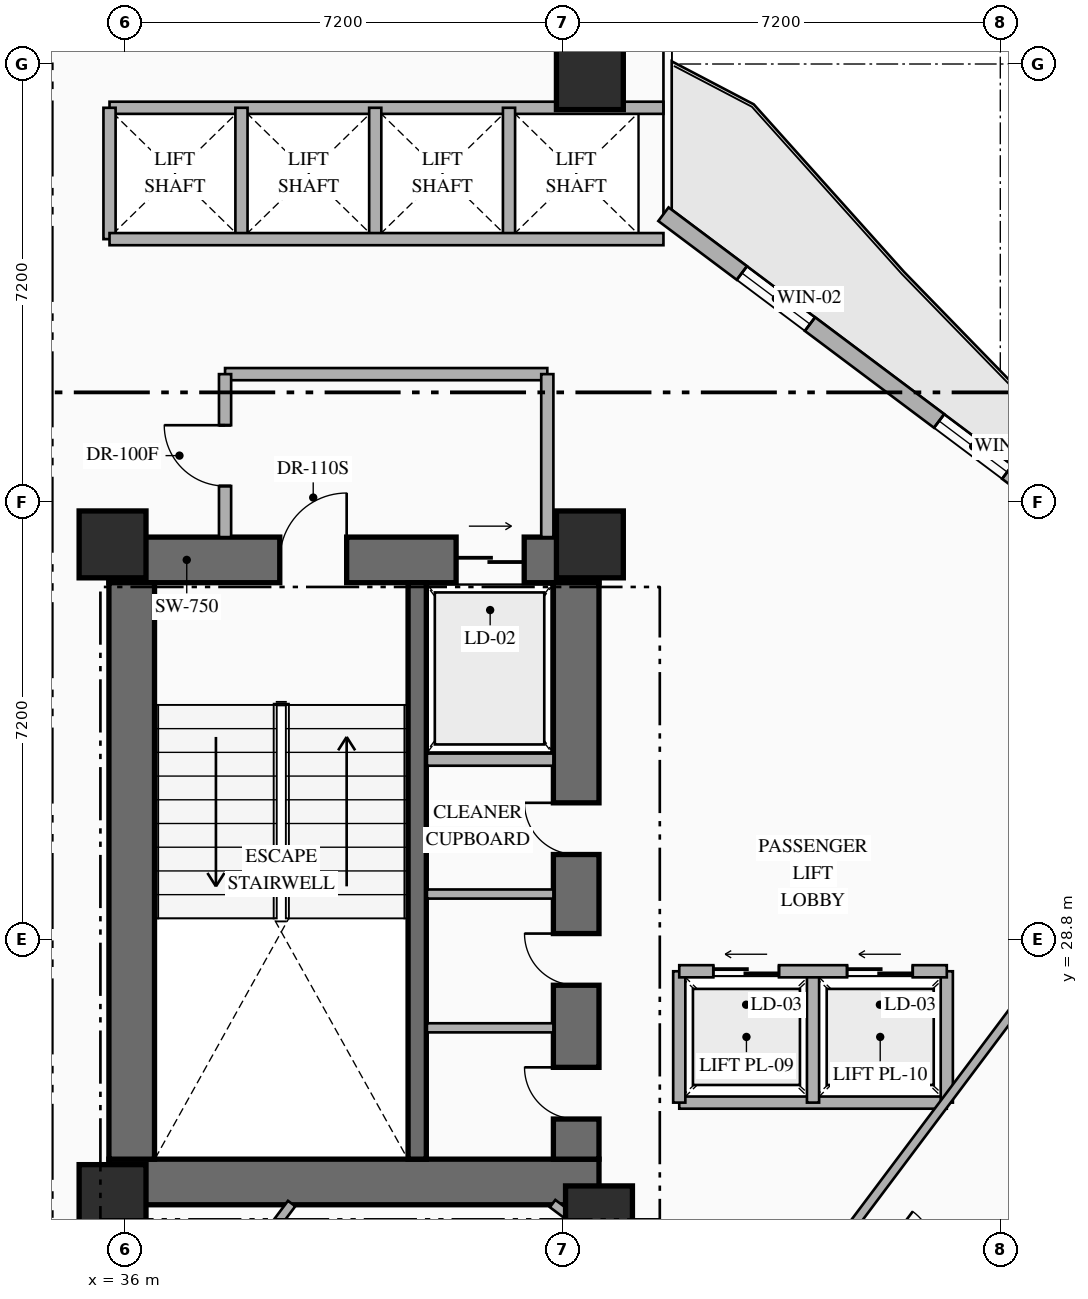
"""IFC4 building model, lengths in metres.
Left out: names, types, materials, properties, quantities, classifications, styles, units other than length and angle.
Written with IfcOpenShell. Run it as: python <this file> out.ifc"""

import sys

from ifc_helpers import new_model, si_unit, direction, frame, frame_2d, origin, origin_2d, place, context, subcontext, project, spatial, rectangle, extrude, element, fill, save


model = new_model("IFC4")
c1 = context("Model", 3, precision=1e-05, world=origin(), true_north=direction((0.0, 1.0)))
c2 = subcontext(c1, "Body", "Model", "MODEL_VIEW")
j1 = project(units=[si_unit("LENGTHUNIT", "METRE"), si_unit("PLANEANGLEUNIT", "RADIAN")], contexts=[c1])
p1 = place(None, origin())
s1 = spatial("IfcSite", under=j1, at=p1, CompositionType="ELEMENT")
p2 = place(p1, origin())
s2 = spatial("IfcBuilding", under=s1, at=p2, CompositionType="ELEMENT")
p3 = place(p2, frame((0.0, 0.0, 60.05)))
s3 = spatial("IfcBuildingStorey", under=s2, at=p3, CompositionType="ELEMENT", Elevation=60.05)
p4 = place(p3, frame((35.74, 24.815, 0.0), z_axis=(0.0, 0.0, 1.0), x_axis=(1.0, 0.0, 0.0)))
e1 = element("IfcWall", 1, at=p4, inside=s3, PredefinedType="SHEAR", context=c2, shape_type="SweptSolid", body=[
    extrude(rectangle(XDim=8.06, YDim=0.75, at=frame_2d((4.03, 0.0))), origin(), (0.0, 0.0, 1.0), 3.35),
])
p5 = place(p3, frame((35.74, 35.045, 0.0), z_axis=(0.0, 0.0, 1.0), x_axis=(1.0, 0.0, 0.0)))
e2 = element("IfcWall", 2, at=p5, inside=s3, PredefinedType="SHEAR", context=c2, shape_type="SweptSolid", body=[
    extrude(rectangle(XDim=8.06, YDim=0.75, at=frame_2d((4.03, 0.0))), origin(), (0.0, 0.0, 1.0), 3.35),
])
p6 = place(p5, frame((2.81, 0.0, 0.0)))
e3 = element("IfcOpeningElement", 3, at=p6, cuts=e2, PredefinedType="OPENING", context=c2, shape_type="SweptSolid", body=[
    extrude(rectangle(XDim=1.1, YDim=2.2, at=frame_2d((0.55, 1.1))), frame((0.0, 0.385, 0.0), z_axis=(0.0, -1.0, 0.0), x_axis=(1.0, 0.0, 0.0)), (0.0, 0.0, 1.0), 0.77),
])
p7 = place(p5, frame((5.71, 0.0, 0.0)))
e4 = element("IfcOpeningElement", 4, at=p7, cuts=e2, PredefinedType="OPENING", context=c2, shape_type="SweptSolid", body=[
    extrude(rectangle(XDim=1.12, YDim=2.15, at=frame_2d((0.56, 1.075))), frame((0.0, 0.385, 0.0), z_axis=(0.0, -1.0, 0.0), x_axis=(1.0, 0.0, 0.0)), (0.0, 0.0, 1.0), 0.77),
])
p8 = place(p3, frame((36.115, 25.19, 0.0), z_axis=(0.0, 0.0, 1.0), x_axis=(0.0, 1.0, 0.0)))
e5 = element("IfcWall", 5, at=p8, inside=s3, PredefinedType="SHEAR", context=c2, shape_type="SweptSolid", body=[
    extrude(rectangle(XDim=9.48, YDim=0.75, at=frame_2d((4.74, 0.0))), origin(), (0.0, 0.0, 1.0), 3.35),
])
p9 = place(p3, frame((43.425, 25.19, 0.0), z_axis=(0.0, 0.0, 1.0), x_axis=(0.0, 1.0, 0.0)))
e6 = element("IfcWall", 6, at=p9, inside=s3, PredefinedType="SHEAR", context=c2, shape_type="SweptSolid", body=[
    extrude(rectangle(XDim=9.48, YDim=0.75, at=frame_2d((4.74, 0.0))), origin(), (0.0, 0.0, 1.0), 3.35),
])
p10 = place(p9, frame((0.66, 0.0, 0.0)))
e7 = element("IfcOpeningElement", 7, at=p10, cuts=e6, PredefinedType="OPENING", context=c2, shape_type="SweptSolid", body=[
    extrude(rectangle(XDim=0.85, YDim=2.08, at=frame_2d((0.425, 1.04))), frame((0.0, 0.385, 0.0), z_axis=(0.0, -1.0, 0.0), x_axis=(1.0, 0.0, 0.0)), (0.0, 0.0, 1.0), 0.77),
])
p11 = place(p9, frame((2.86, 0.0, 0.0)))
e8 = element("IfcOpeningElement", 8, at=p11, cuts=e6, PredefinedType="OPENING", context=c2, shape_type="SweptSolid", body=[
    extrude(rectangle(XDim=0.85, YDim=2.08, at=frame_2d((0.425, 1.04))), frame((0.0, 0.385, 0.0), z_axis=(0.0, -1.0, 0.0), x_axis=(1.0, 0.0, 0.0)), (0.0, 0.0, 1.0), 0.77),
])
p12 = place(p9, frame((5.01, 0.0, 0.0)))
e9 = element("IfcOpeningElement", 9, at=p12, cuts=e6, PredefinedType="OPENING", context=c2, shape_type="SweptSolid", body=[
    extrude(rectangle(XDim=0.85, YDim=2.08, at=frame_2d((0.425, 1.04))), frame((0.0, 0.385, 0.0), z_axis=(0.0, -1.0, 0.0), x_axis=(1.0, 0.0, 0.0)), (0.0, 0.0, 1.0), 0.77),
])
p13 = place(p3, frame((40.81, 25.19, 0.0), z_axis=(0.0, 0.0, 1.0), x_axis=(0.0, 1.0, 0.0)))
e10 = element("IfcWall", 10, at=p13, inside=s3, PredefinedType="SHEAR", context=c2, shape_type="SweptSolid", body=[
    extrude(rectangle(XDim=9.48, YDim=0.3, at=frame_2d((4.74, 0.0))), origin(), (0.0, 0.0, 1.0), 3.35),
])
for number, where, z_axis, x_axis in (
    (11, (35.8, 24.55, 0.0), (0.0, 0.0, 1.0), (1.0, 0.0, 0.0)),
    (12, (43.8, 24.2, 0.0), (0.0, 0.0, 1.0), (1.0, 0.0, 0.0)),
    (13, (35.8, 35.3, 0.0), (0.0, 0.0, 1.0), (1.0, 0.0, 0.0)),
    (14, (43.65, 35.3, 0.0), (0.0, 0.0, 1.0), (1.0, 0.0, 0.0)),
    (15, (43.65, 43.0, 0.0), (0.0, 0.0, 1.0), (1.0, 0.0, 0.0)),
):
    element("IfcColumn", number, at=place(p3, frame(where, z_axis=z_axis, x_axis=x_axis)), inside=s3, PredefinedType="COLUMN", context=c2, shape_type="SweptSolid", body=[
        extrude(rectangle(XDim=1.1, YDim=1.1, at=origin_2d()), origin(), (0.0, 0.0, 1.0), 3.35),
    ])
p14 = place(p3, frame((44.86, 40.73, 0.0), z_axis=(0.0, 0.0, 1.0), x_axis=(0.800006902154, -0.599990797017, 0.0)))
e16 = element("IfcWall", 16, at=p14, inside=s3, PredefinedType="STANDARD", context=c2, shape_type="SweptSolid", body=[
    extrude(rectangle(XDim=29.712, YDim=0.28, at=frame_2d((14.856, 0.0))), origin(), (0.0, 0.0, 1.0), 3.13),
])
p15 = place(p14, frame((14.249, 0.0, 0.0)))
e17 = element("IfcOpeningElement", 17, at=p15, cuts=e16, PredefinedType="OPENING", context=c2, shape_type="SweptSolid", body=[
    extrude(rectangle(XDim=1.1, YDim=2.2, at=frame_2d((0.55, 1.1))), frame((0.0, 0.15, 0.0), z_axis=(0.0, -1.0, 0.0), x_axis=(1.0, 0.0, 0.0)), (0.0, 0.0, 1.0), 0.3),
])
p16 = place(p14, frame((1.612, 0.0, 0.85)))
e18 = element("IfcOpeningElement", 18, at=p16, cuts=e16, PredefinedType="OPENING", context=c2, shape_type="SweptSolid", body=[
    extrude(rectangle(XDim=1.4, YDim=1.8, at=frame_2d((0.7, 0.9))), frame((0.0, 0.15, 0.0), z_axis=(0.0, -1.0, 0.0), x_axis=(1.0, 0.0, 0.0)), (0.0, 0.0, 1.0), 0.3),
])
p17 = place(p14, frame((5.667, 0.0, 0.85)))
e19 = element("IfcOpeningElement", 19, at=p17, cuts=e16, PredefinedType="OPENING", context=c2, shape_type="SweptSolid", body=[
    extrude(rectangle(XDim=1.4, YDim=1.8, at=frame_2d((0.7, 0.9))), frame((0.0, 0.15, 0.0), z_axis=(0.0, -1.0, 0.0), x_axis=(1.0, 0.0, 0.0)), (0.0, 0.0, 1.0), 0.3),
])
p18 = place(p14, frame((9.912, 0.0, 0.85)))
e20 = element("IfcOpeningElement", 20, at=p18, cuts=e16, PredefinedType="OPENING", context=c2, shape_type="SweptSolid", body=[
    extrude(rectangle(XDim=1.4, YDim=1.8, at=frame_2d((0.7, 0.9))), frame((0.0, 0.15, 0.0), z_axis=(0.0, -1.0, 0.0), x_axis=(1.0, 0.0, 0.0)), (0.0, 0.0, 1.0), 0.3),
])
p19 = place(p14, frame((18.803, 0.0, 0.85)))
e21 = element("IfcOpeningElement", 21, at=p19, cuts=e16, PredefinedType="OPENING", context=c2, shape_type="SweptSolid", body=[
    extrude(rectangle(XDim=1.4, YDim=1.8, at=frame_2d((0.7, 0.9))), frame((0.0, 0.15, 0.0), z_axis=(0.0, -1.0, 0.0), x_axis=(1.0, 0.0, 0.0)), (0.0, 0.0, 1.0), 0.3),
])
p20 = place(p14, frame((22.645, 0.0, 0.85)))
e22 = element("IfcOpeningElement", 22, at=p20, cuts=e16, PredefinedType="OPENING", context=c2, shape_type="SweptSolid", body=[
    extrude(rectangle(XDim=1.4, YDim=1.8, at=frame_2d((0.7, 0.9))), frame((0.0, 0.15, 0.0), z_axis=(0.0, -1.0, 0.0), x_axis=(1.0, 0.0, 0.0)), (0.0, 0.0, 1.0), 0.3),
])
p21 = place(p14, frame((27.668, 0.0, 0.85)))
e23 = element("IfcOpeningElement", 23, at=p21, cuts=e16, PredefinedType="OPENING", context=c2, shape_type="SweptSolid", body=[
    extrude(rectangle(XDim=1.4, YDim=1.8, at=frame_2d((0.7, 0.9))), frame((0.0, 0.15, 0.0), z_axis=(0.0, -1.0, 0.0), x_axis=(1.0, 0.0, 0.0)), (0.0, 0.0, 1.0), 0.3),
])
p22 = place(p3, frame((40.97, 31.76, 0.0), z_axis=(0.0, 0.0, 1.0), x_axis=(1.0, 0.0, 0.0)))
e24 = element("IfcWall", 24, at=p22, inside=s3, PredefinedType="STANDARD", context=c2, shape_type="SweptSolid", body=[
    extrude(rectangle(XDim=2.08, YDim=0.2, at=frame_2d((1.04, 0.0))), origin(), (0.0, 0.0, 1.0), 3.13),
])
for number, where, z_axis, x_axis in (
    (25, (40.97, 27.35, 0.0), (0.0, 0.0, 1.0), (1.0, 0.0, 0.0)),
    (26, (40.97, 29.55, 0.0), (0.0, 0.0, 1.0), (1.0, 0.0, 0.0)),
):
    element("IfcWall", number, at=place(p3, frame(where, z_axis=z_axis, x_axis=x_axis)), inside=s3, PredefinedType="PARTITIONING", context=c2, shape_type="SweptSolid", body=[
        extrude(rectangle(XDim=2.08, YDim=0.15, at=frame_2d((1.04, 0.0))), origin(), (0.0, 0.0, 1.0), 3.13),
    ])
p23 = place(p3, frame((37.65, 38.1, 0.0), z_axis=(0.0, 0.0, 1.0), x_axis=(1.0, 0.0, 0.0)))
e27 = element("IfcWall", 27, at=p23, inside=s3, PredefinedType="STANDARD", context=c2, shape_type="SweptSolid", body=[
    extrude(rectangle(XDim=5.3, YDim=0.2, at=frame_2d((2.65, 0.0))), origin(), (0.0, 0.0, 1.0), 3.13),
])
p24 = place(p3, frame((42.95, 35.42, 0.0), z_axis=(0.0, 0.0, 1.0), x_axis=(0.0, 1.0, 0.0)))
e28 = element("IfcWall", 28, at=p24, inside=s3, PredefinedType="STANDARD", context=c2, shape_type="SweptSolid", body=[
    extrude(rectangle(XDim=2.68, YDim=0.2, at=frame_2d((1.34, 0.0))), origin(), (0.0, 0.0, 1.0), 3.13),
])
p25 = place(p3, frame((37.65, 35.42, 0.0), z_axis=(0.0, 0.0, 1.0), x_axis=(0.0, 1.0, 0.0)))
e29 = element("IfcWall", 29, at=p25, inside=s3, PredefinedType="STANDARD", context=c2, shape_type="SweptSolid", body=[
    extrude(rectangle(XDim=2.68, YDim=0.2, at=frame_2d((1.34, 0.0))), origin(), (0.0, 0.0, 1.0), 3.13),
])
p26 = place(p25, frame((0.84, 0.0, 0.0)))
e30 = element("IfcOpeningElement", 30, at=p26, cuts=e29, PredefinedType="OPENING", context=c2, shape_type="SweptSolid", body=[
    extrude(rectangle(XDim=1.0, YDim=2.2, at=frame_2d((0.5, 1.1))), frame((0.0, 0.11, 0.0), z_axis=(0.0, -1.0, 0.0), x_axis=(1.0, 0.0, 0.0)), (0.0, 0.0, 1.0), 0.22),
])
p27 = place(p3, frame((35.75, 42.48, 0.0), z_axis=(0.0, 0.0, 1.0), x_axis=(1.0, 0.0, 0.0)))
e31 = element("IfcWall", 31, at=p27, inside=s3, PredefinedType="STANDARD", context=c2, shape_type="SweptSolid", body=[
    extrude(rectangle(XDim=9.11, YDim=0.2, at=frame_2d((4.555, 0.0))), origin(), (0.0, 0.0, 1.0), 3.13),
])
for number, where, z_axis, x_axis in (
    (32, (35.75, 40.32, 0.0), (0.0, 0.0, 1.0), (0.0, 1.0, 0.0)),
    (33, (37.92, 40.32, 0.0), (0.0, 0.0, 1.0), (0.0, 1.0, 0.0)),
    (34, (40.12, 40.32, 0.0), (0.0, 0.0, 1.0), (0.0, 1.0, 0.0)),
    (35, (42.32, 40.32, 0.0), (0.0, 0.0, 1.0), (0.0, 1.0, 0.0)),
):
    element("IfcWall", number, at=place(p3, frame(where, z_axis=z_axis, x_axis=x_axis)), inside=s3, PredefinedType="STANDARD", context=c2, shape_type="SweptSolid", body=[
        extrude(rectangle(XDim=2.16, YDim=0.2, at=frame_2d((1.08, 0.0))), origin(), (0.0, 0.0, 1.0), 3.13),
    ])
p28 = place(p3, frame((35.75, 40.32, 0.0), z_axis=(0.0, 0.0, 1.0), x_axis=(1.0, 0.0, 0.0)))
e36 = element("IfcWall", 36, at=p28, inside=s3, PredefinedType="STANDARD", context=c2, shape_type="SweptSolid", body=[
    extrude(rectangle(XDim=9.11, YDim=0.2, at=frame_2d((4.555, 0.0))), origin(), (0.0, 0.0, 1.0), 3.13),
])
p29 = place(p3, frame((45.12, 26.12, 0.0), z_axis=(0.0, 0.0, 1.0), x_axis=(1.0, 0.0, 0.0)))
e37 = element("IfcWall", 37, at=p29, inside=s3, PredefinedType="STANDARD", context=c2, shape_type="SweptSolid", body=[
    extrude(rectangle(XDim=4.4, YDim=0.2, at=frame_2d((2.2, 0.0))), origin(), (0.0, 0.0, 1.0), 3.13),
])
for number, where, z_axis, x_axis in (
    (38, (45.12, 26.12, 0.0), (0.0, 0.0, 1.0), (0.0, 1.0, 0.0)),
    (39, (49.52, 26.12, 0.0), (0.0, 0.0, 1.0), (0.0, 1.0, 0.0)),
    (40, (47.32, 26.12, 0.0), (0.0, 0.0, 1.0), (0.0, 1.0, 0.0)),
):
    element("IfcWall", number, at=place(p3, frame(where, z_axis=z_axis, x_axis=x_axis)), inside=s3, PredefinedType="STANDARD", context=c2, shape_type="SweptSolid", body=[
        extrude(rectangle(XDim=2.16, YDim=0.2, at=frame_2d((1.08, 0.0))), origin(), (0.0, 0.0, 1.0), 3.13),
    ])
p30 = place(p3, frame((45.12, 28.28, 0.0), z_axis=(0.0, 0.0, 1.0), x_axis=(1.0, 0.0, 0.0)))
e41 = element("IfcWall", 41, at=p30, inside=s3, PredefinedType="STANDARD", context=c2, shape_type="SweptSolid", body=[
    extrude(rectangle(XDim=4.4, YDim=0.2, at=frame_2d((2.2, 0.0))), origin(), (0.0, 0.0, 1.0), 3.13),
])
p31 = place(p30, frame((0.56, 0.0, 0.0)))
e42 = element("IfcOpeningElement", 42, at=p31, cuts=e41, PredefinedType="OPENING", context=c2, shape_type="SweptSolid", body=[
    extrude(rectangle(XDim=1.08, YDim=2.15, at=frame_2d((0.54, 1.075))), frame((0.0, 0.11, 0.0), z_axis=(0.0, -1.0, 0.0), x_axis=(1.0, 0.0, 0.0)), (0.0, 0.0, 1.0), 0.22),
])
p32 = place(p30, frame((2.76, 0.0, 0.0)))
e43 = element("IfcOpeningElement", 43, at=p32, cuts=e41, PredefinedType="OPENING", context=c2, shape_type="SweptSolid", body=[
    extrude(rectangle(XDim=1.08, YDim=2.15, at=frame_2d((0.54, 1.075))), frame((0.0, 0.11, 0.0), z_axis=(0.0, -1.0, 0.0), x_axis=(1.0, 0.0, 0.0)), (0.0, 0.0, 1.0), 0.22),
])
p33 = place(p3, frame((43.037, 24.46, 0.0), z_axis=(0.0, 0.0, 1.0), x_axis=(0.799971872363, -0.600037501685, 0.0)))
e44 = element("IfcWall", 44, at=p33, inside=s3, PredefinedType="PARTITIONING", context=c2, shape_type="SweptSolid", body=[
    extrude(rectangle(XDim=4.167, YDim=0.15, at=frame_2d((2.083, 0.0))), origin(), (0.0, 0.0, 1.0), 2.425),
])
p34 = place(p33, frame((2.468, 0.0, 0.0)))
e45 = element("IfcOpeningElement", 45, at=p34, cuts=e44, PredefinedType="OPENING", context=c2, shape_type="SweptSolid", body=[
    extrude(rectangle(XDim=0.95, YDim=2.15, at=frame_2d((0.475, 1.075))), frame((0.0, 0.085, 0.0), z_axis=(0.0, -1.0, 0.0), x_axis=(1.0, 0.0, 0.0)), (0.0, 0.0, 1.0), 0.17),
])
p35 = place(p3, frame((33.384, 17.312, 0.0), z_axis=(0.0, 0.0, 1.0), x_axis=(0.600008743659, 0.799993442181, 0.0)))
e46 = element("IfcWall", 46, at=p35, inside=s3, PredefinedType="PARTITIONING", context=c2, shape_type="SweptSolid", body=[
    extrude(rectangle(XDim=8.935, YDim=0.15, at=frame_2d((4.468, 0.0))), origin(), (0.0, 0.0, 1.0), 3.13),
])
p36 = place(p3, frame((49.67, 22.61, 0.0), z_axis=(0.0, 0.0, 1.0), x_axis=(0.600065100855, 0.79995117022, 0.0)))
e47 = element("IfcWall", 47, at=p36, inside=s3, PredefinedType="PARTITIONING", context=c2, shape_type="SweptSolid", body=[
    extrude(rectangle(XDim=2.4, YDim=0.12, at=frame_2d((1.2, 0.0))), origin(), (0.0, 0.0, 1.0), 3.13),
])
p37 = place(p36, frame((0.8, 0.0, 0.0)))
e48 = element("IfcOpeningElement", 48, at=p37, cuts=e47, PredefinedType="OPENING", context=c2, shape_type="SweptSolid", body=[
    extrude(rectangle(XDim=0.8, YDim=2.06, at=frame_2d((0.4, 1.03))), frame((0.0, 0.07, 0.0), z_axis=(0.0, -1.0, 0.0), x_axis=(1.0, 0.0, 0.0)), (0.0, 0.0, 1.0), 0.14),
])
p38 = place(p3, frame((47.87, 23.96, 0.0), z_axis=(0.0, 0.0, 1.0), x_axis=(0.599996617946, 0.80000253653, 0.0)))
e49 = element("IfcWall", 49, at=p38, inside=s3, PredefinedType="PARTITIONING", context=c2, shape_type="SweptSolid", body=[
    extrude(rectangle(XDim=11.55, YDim=0.15, at=frame_2d((5.775, 0.0))), origin(), (0.0, 0.0, 1.0), 3.13),
])
p39 = place(p16, origin())
e50 = element("IfcWindow", 50, at=p39, inside=s3, PartitioningType="SINGLE_PANEL", PredefinedType="WINDOW", context=c2, shape_type="SweptSolid", body=[
    extrude(rectangle(XDim=1.4, YDim=1.8, at=frame_2d((0.7, 0.9))), frame((0.0, 0.03, 0.0), z_axis=(0.0, -1.0, 0.0), x_axis=(1.0, 0.0, 0.0)), (0.0, 0.0, 1.0), 0.06),
])
fill(e18, e50)
p40 = place(p17, origin())
e51 = element("IfcWindow", 51, at=p40, inside=s3, PartitioningType="SINGLE_PANEL", PredefinedType="WINDOW", context=c2, shape_type="SweptSolid", body=[
    extrude(rectangle(XDim=1.4, YDim=1.8, at=frame_2d((0.7, 0.9))), frame((0.0, 0.03, 0.0), z_axis=(0.0, -1.0, 0.0), x_axis=(1.0, 0.0, 0.0)), (0.0, 0.0, 1.0), 0.06),
])
fill(e19, e51)
p41 = place(p6, origin())
e52 = element("IfcDoor", 52, at=p41, inside=s3, OperationType="SINGLE_SWING_RIGHT", PredefinedType="DOOR", context=c2, shape_type="SweptSolid", body=[
    extrude(rectangle(XDim=1.1, YDim=2.2, at=frame_2d((0.55, 1.1))), frame((0.0, 0.025, 0.0), z_axis=(0.0, -1.0, 0.0), x_axis=(1.0, 0.0, 0.0)), (0.0, 0.0, 1.0), 0.05),
])
fill(e3, e52)
p42 = place(p7, origin())
e53 = element("IfcDoor", 53, at=p42, inside=s3, OperationType="SLIDING_TO_RIGHT", PredefinedType="USERDEFINED", context=c2, shape_type="SweptSolid", body=[
    extrude(rectangle(XDim=1.12, YDim=2.15, at=frame_2d((0.56, 1.075))), frame((0.0, 0.025, 0.0), z_axis=(0.0, -1.0, 0.0), x_axis=(1.0, 0.0, 0.0)), (0.0, 0.0, 1.0), 0.05),
])
fill(e4, e53)
p43 = place(p10, origin())
e54 = element("IfcDoor", 54, at=p43, inside=s3, OperationType="SINGLE_SWING_RIGHT", PredefinedType="DOOR", context=c2, shape_type="SweptSolid", body=[
    extrude(rectangle(XDim=0.85, YDim=2.08, at=frame_2d((0.425, 1.04))), frame((0.0, 0.025, 0.0), z_axis=(0.0, -1.0, 0.0), x_axis=(1.0, 0.0, 0.0)), (0.0, 0.0, 1.0), 0.05),
])
fill(e7, e54)
p44 = place(p11, origin())
e55 = element("IfcDoor", 55, at=p44, inside=s3, OperationType="SINGLE_SWING_RIGHT", PredefinedType="DOOR", context=c2, shape_type="SweptSolid", body=[
    extrude(rectangle(XDim=0.85, YDim=2.08, at=frame_2d((0.425, 1.04))), frame((0.0, 0.025, 0.0), z_axis=(0.0, -1.0, 0.0), x_axis=(1.0, 0.0, 0.0)), (0.0, 0.0, 1.0), 0.05),
])
fill(e8, e55)
p45 = place(p12, origin())
e56 = element("IfcDoor", 56, at=p45, inside=s3, OperationType="SINGLE_SWING_RIGHT", PredefinedType="DOOR", context=c2, shape_type="SweptSolid", body=[
    extrude(rectangle(XDim=0.85, YDim=2.08, at=frame_2d((0.425, 1.04))), frame((0.0, 0.025, 0.0), z_axis=(0.0, -1.0, 0.0), x_axis=(1.0, 0.0, 0.0)), (0.0, 0.0, 1.0), 0.05),
])
fill(e9, e56)
p46 = place(p26, origin())
e57 = element("IfcDoor", 57, at=p46, inside=s3, OperationType="SINGLE_SWING_RIGHT", PredefinedType="DOOR", context=c2, shape_type="SweptSolid", body=[
    extrude(rectangle(XDim=1.0, YDim=2.2, at=frame_2d((0.5, 1.1))), frame((0.0, 0.025, 0.0), z_axis=(0.0, -1.0, 0.0), x_axis=(1.0, 0.0, 0.0)), (0.0, 0.0, 1.0), 0.05),
])
fill(e30, e57)
p47 = place(p31, origin())
e58 = element("IfcDoor", 58, at=p47, inside=s3, OperationType="SLIDING_TO_LEFT", PredefinedType="USERDEFINED", context=c2, shape_type="SweptSolid", body=[
    extrude(rectangle(XDim=1.08, YDim=2.15, at=frame_2d((0.54, 1.075))), frame((0.0, 0.025, 0.0), z_axis=(0.0, -1.0, 0.0), x_axis=(1.0, 0.0, 0.0)), (0.0, 0.0, 1.0), 0.05),
])
fill(e42, e58)
p48 = place(p32, origin())
e59 = element("IfcDoor", 59, at=p48, inside=s3, OperationType="SLIDING_TO_LEFT", PredefinedType="USERDEFINED", context=c2, shape_type="SweptSolid", body=[
    extrude(rectangle(XDim=1.08, YDim=2.15, at=frame_2d((0.54, 1.075))), frame((0.0, 0.025, 0.0), z_axis=(0.0, -1.0, 0.0), x_axis=(1.0, 0.0, 0.0)), (0.0, 0.0, 1.0), 0.05),
])
fill(e43, e59)
save(model, sys.argv[1])
